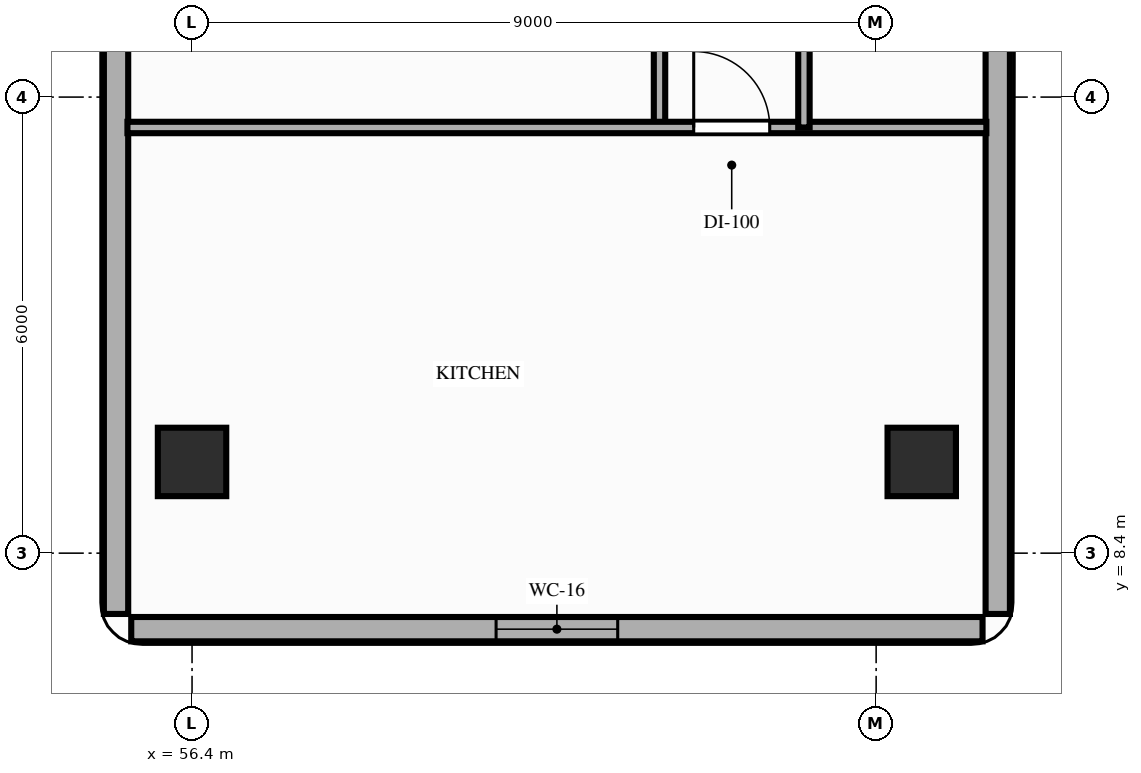
"""IFC4 building model, lengths in metres.
Left out: names, types, materials, properties, quantities, classifications, styles, units other than length and angle.
Written with IfcOpenShell. Run it as: python <this file> out.ifc"""

import sys

from ifc_helpers import new_model, si_unit, direction, frame, frame_2d, origin, origin_2d, place, context, subcontext, project, spatial, rectangle, extrude, element, fill, save


model = new_model("IFC4")
c1 = context("Model", 3, precision=1e-05, world=origin(), true_north=direction((0.0, 1.0)))
c2 = subcontext(c1, "Body", "Model", "MODEL_VIEW")
j1 = project(units=[si_unit("LENGTHUNIT", "METRE"), si_unit("PLANEANGLEUNIT", "RADIAN")], contexts=[c1])
p1 = place(None, origin())
s1 = spatial("IfcSite", under=j1, at=p1, CompositionType="ELEMENT")
p2 = place(p1, origin())
s2 = spatial("IfcBuilding", under=s1, at=p2, CompositionType="ELEMENT")
p3 = place(p2, frame((0.0, 0.0, 56.4)))
s3 = spatial("IfcBuildingStorey", under=s2, at=p3, CompositionType="ELEMENT", Elevation=56.4)
for number, where, z_axis, x_axis in (
    (1, (56.4, 9.6, 0.0), (0.0, 0.0, 1.0), (1.0, 0.0, 0.0)),
    (2, (66.0, 9.6, 0.0), (0.0, 0.0, 1.0), (1.0, 0.0, 0.0)),
):
    element("IfcColumn", number, at=place(p3, frame(where, z_axis=z_axis, x_axis=x_axis)), inside=s3, PredefinedType="COLUMN", context=c2, shape_type="SweptSolid", body=[
        extrude(rectangle(XDim=0.9, YDim=0.9, at=origin_2d()), origin(), (0.0, 0.0, 1.0), 3.2),
    ])
p4 = place(p3, frame((55.6, 7.4, 0.0), z_axis=(0.0, 0.0, 1.0), x_axis=(1.0, 0.0, 0.0)))
e3 = element("IfcWall", 3, at=p4, inside=s3, PredefinedType="STANDARD", context=c2, shape_type="SweptSolid", body=[
    extrude(rectangle(XDim=11.2, YDim=0.32, at=frame_2d((5.6, 0.0))), origin(), (0.0, 0.0, 1.0), 3.02),
])
p5 = place(p4, frame((4.8, 0.0, 0.85)))
e4 = element("IfcOpeningElement", 4, at=p5, cuts=e3, PredefinedType="OPENING", context=c2, shape_type="SweptSolid", body=[
    extrude(rectangle(XDim=1.6, YDim=1.7, at=frame_2d((0.8, 0.85))), frame((0.0, 0.17, 0.0), z_axis=(0.0, -1.0, 0.0), x_axis=(1.0, 0.0, 0.0)), (0.0, 0.0, 1.0), 0.34),
])
for number, where, z_axis, x_axis in (
    (5, (55.4, 20.4, 0.0), (0.0, 0.0, 1.0), (0.0, -1.0, 0.0)),
    (6, (67.0, 7.6, 0.0), (0.0, 0.0, 1.0), (0.0, 1.0, 0.0)),
):
    element("IfcWall", number, at=place(p3, frame(where, z_axis=z_axis, x_axis=x_axis)), inside=s3, PredefinedType="STANDARD", context=c2, shape_type="SweptSolid", body=[
        extrude(rectangle(XDim=12.8, YDim=0.32, at=frame_2d((6.4, 0.0))), origin(), (0.0, 0.0, 1.0), 3.02),
    ])
p6 = place(p3, frame((62.55, 14.0, 0.0), z_axis=(0.0, 0.0, 1.0), x_axis=(0.0, 1.0, 0.0)))
e7 = element("IfcWall", 7, at=p6, inside=s3, PredefinedType="PARTITIONING", context=c2, shape_type="SweptSolid", body=[
    extrude(rectangle(XDim=6.75, YDim=0.15, at=frame_2d((3.375, 0.0))), origin(), (0.0, 0.0, 1.0), 2.51),
])
p7 = place(p6, frame((2.6, 0.0, 0.0)))
e8 = element("IfcOpeningElement", 8, at=p7, cuts=e7, PredefinedType="OPENING", context=c2, shape_type="SweptSolid", body=[
    extrude(rectangle(XDim=0.95, YDim=2.15, at=frame_2d((0.475, 1.075))), frame((0.0, 0.085, 0.0), z_axis=(0.0, -1.0, 0.0), x_axis=(1.0, 0.0, 0.0)), (0.0, 0.0, 1.0), 0.17),
])
p8 = place(p3, frame((55.55, 14.0, 0.0), z_axis=(0.0, 0.0, 1.0), x_axis=(1.0, 0.0, 0.0)))
e9 = element("IfcWall", 9, at=p8, inside=s3, PredefinedType="PARTITIONING", context=c2, shape_type="SweptSolid", body=[
    extrude(rectangle(XDim=11.3, YDim=0.15, at=frame_2d((5.65, 0.0))), origin(), (0.0, 0.0, 1.0), 2.51),
])
p9 = place(p8, frame((7.45, 0.0, 0.0)))
e10 = element("IfcOpeningElement", 10, at=p9, cuts=e9, PredefinedType="OPENING", context=c2, shape_type="SweptSolid", body=[
    extrude(rectangle(XDim=1.0, YDim=2.15, at=frame_2d((0.5, 1.075))), frame((0.0, 0.085, 0.0), z_axis=(0.0, -1.0, 0.0), x_axis=(1.0, 0.0, 0.0)), (0.0, 0.0, 1.0), 0.17),
])
p10 = place(p3, frame((64.45, 14.0, 0.0), z_axis=(0.0, 0.0, 1.0), x_axis=(0.0, 1.0, 0.0)))
e11 = element("IfcWall", 11, at=p10, inside=s3, PredefinedType="PARTITIONING", context=c2, shape_type="SweptSolid", body=[
    extrude(rectangle(XDim=6.75, YDim=0.15, at=frame_2d((3.375, 0.0))), origin(), (0.0, 0.0, 1.0), 2.51),
])
p11 = place(p10, frame((3.24, 0.0, 0.0)))
e12 = element("IfcOpeningElement", 12, at=p11, cuts=e11, PredefinedType="OPENING", context=c2, shape_type="SweptSolid", body=[
    extrude(rectangle(XDim=0.95, YDim=2.15, at=frame_2d((0.475, 1.075))), frame((0.0, 0.085, 0.0), z_axis=(0.0, -1.0, 0.0), x_axis=(1.0, 0.0, 0.0)), (0.0, 0.0, 1.0), 0.17),
])
p12 = place(p5, origin())
e13 = element("IfcWindow", 13, at=p12, inside=s3, PartitioningType="SINGLE_PANEL", PredefinedType="WINDOW", context=c2, shape_type="SweptSolid", body=[
    extrude(rectangle(XDim=1.6, YDim=1.7, at=frame_2d((0.8, 0.85))), frame((0.0, 0.03, 0.0), z_axis=(0.0, -1.0, 0.0), x_axis=(1.0, 0.0, 0.0)), (0.0, 0.0, 1.0), 0.06),
])
fill(e4, e13)
p13 = place(p9, origin())
e14 = element("IfcDoor", 14, at=p13, inside=s3, OperationType="SINGLE_SWING_LEFT", PredefinedType="DOOR", context=c2, shape_type="SweptSolid", body=[
    extrude(rectangle(XDim=1.0, YDim=2.15, at=frame_2d((0.5, 1.075))), frame((0.0, 0.025, 0.0), z_axis=(0.0, -1.0, 0.0), x_axis=(1.0, 0.0, 0.0)), (0.0, 0.0, 1.0), 0.05),
])
fill(e10, e14)
save(model, sys.argv[1])
